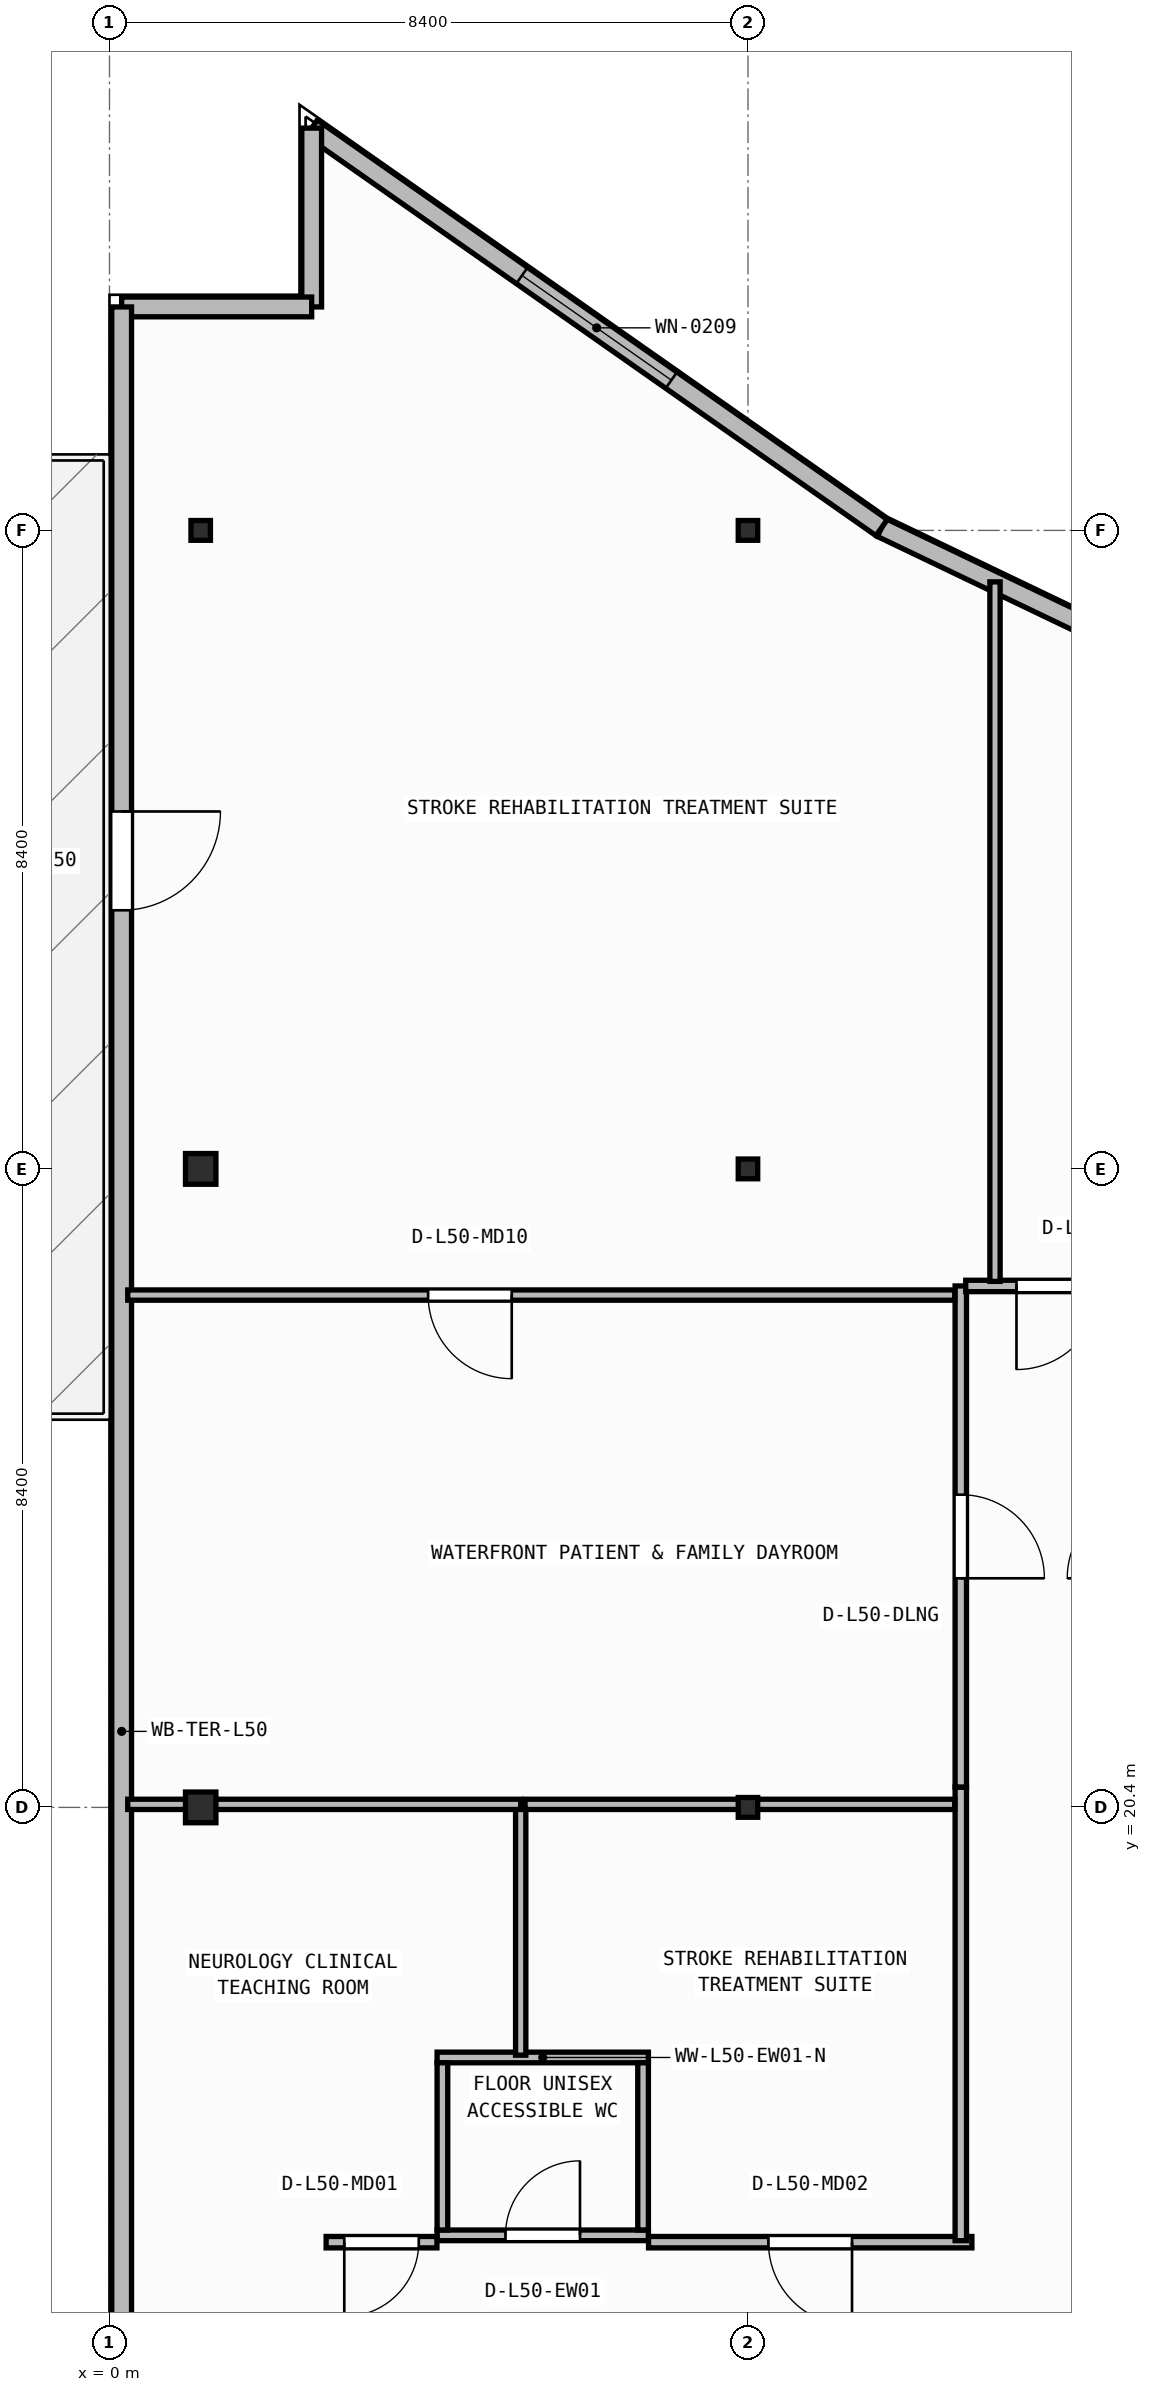
"""IFC4 building model, lengths in metres.
Left out: names, types, materials, properties, quantities, classifications, styles, units other than length and angle.
Written with IfcOpenShell. Run it as: python <this file> out.ifc"""

import sys

from ifc_helpers import new_model, si_unit, direction, frame, frame_2d, origin, origin_2d, place, context, subcontext, project, spatial, rectangle, i_section, extrude, element, fill, save


model = new_model("IFC4")
c1 = context("Model", 3, precision=1e-05, world=origin(), true_north=direction((0.0, 1.0)))
c2 = subcontext(c1, "Body", "Model", "MODEL_VIEW")
j1 = project(units=[si_unit("LENGTHUNIT", "METRE"), si_unit("PLANEANGLEUNIT", "RADIAN")], contexts=[c1])
p1 = place(None, origin())
s1 = spatial("IfcSite", under=j1, at=p1, CompositionType="ELEMENT")
p2 = place(p1, origin())
s2 = spatial("IfcBuilding", under=s1, at=p2, CompositionType="ELEMENT")
p3 = place(p2, frame((0.0, 0.0, 203.95)))
s3 = spatial("IfcBuildingStorey", under=s2, at=p3, CompositionType="ELEMENT", Elevation=203.95)
p4 = place(p3, frame((1.2, 20.4, 0.0), z_axis=(0.0, 0.0, 1.0), x_axis=(1.0, 0.0, 0.0)))
e1 = element("IfcColumn", 1, at=p4, inside=s3, PredefinedType="COLUMN", context=c2, shape_type="SweptSolid", body=[
    extrude(i_section(OverallWidth=0.4, OverallDepth=0.404, WebThickness=0.02, FlangeThickness=0.032, at=origin_2d()), origin(), (0.0, 0.0, 1.0), 3.95),
])
p5 = place(p3, frame((8.4, 20.4, 0.0), z_axis=(0.0, 0.0, 1.0), x_axis=(1.0, 0.0, 0.0)))
e2 = element("IfcColumn", 2, at=p5, inside=s3, PredefinedType="COLUMN", context=c2, shape_type="SweptSolid", body=[
    extrude(i_section(OverallWidth=0.256, OverallDepth=0.26, WebThickness=0.01, FlangeThickness=0.017, FilletRadius=0.013, at=origin_2d()), origin(), (0.0, 0.0, 1.0), 3.95),
])
p6 = place(p3, frame((1.2, 28.8, 0.0), z_axis=(0.0, 0.0, 1.0), x_axis=(1.0, 0.0, 0.0)))
e3 = element("IfcColumn", 3, at=p6, inside=s3, PredefinedType="COLUMN", context=c2, shape_type="SweptSolid", body=[
    extrude(i_section(OverallWidth=0.4, OverallDepth=0.404, WebThickness=0.02, FlangeThickness=0.032, at=origin_2d()), origin(), (0.0, 0.0, 1.0), 3.95),
])
for number, where, z_axis, x_axis in (
    (4, (8.4, 28.8, 0.0), (0.0, 0.0, 1.0), (1.0, 0.0, 0.0)),
    (5, (1.2, 37.2, 0.0), (0.0, 0.0, 1.0), (1.0, 0.0, 0.0)),
    (6, (8.4, 37.2, 0.0), (0.0, 0.0, 1.0), (1.0, 0.0, 0.0)),
):
    element("IfcColumn", number, at=place(p3, frame(where, z_axis=z_axis, x_axis=x_axis)), inside=s3, PredefinedType="COLUMN", context=c2, shape_type="SweptSolid", body=[
        extrude(i_section(OverallWidth=0.256, OverallDepth=0.26, WebThickness=0.01, FlangeThickness=0.017, FilletRadius=0.013, at=origin_2d()), origin(), (0.0, 0.0, 1.0), 3.95),
    ])
p7 = place(p3, frame((21.461, 31.823, 0.0), z_axis=(0.0, 0.0, 1.0), x_axis=(-0.901858094827, 0.432032379336, 0.0)))
e7 = element("IfcWall", 7, at=p7, inside=s3, PredefinedType="STANDARD", context=c2, shape_type="SweptSolid", body=[
    extrude(rectangle(XDim=12.532, YDim=0.26, at=frame_2d((6.266, 0.0))), origin(), (0.0, 0.0, 1.0), 3.71),
])
p8 = place(p7, frame((5.066, 0.0, 0.9)))
e8 = element("IfcOpeningElement", 8, at=p8, cuts=e7, PredefinedType="OPENING", context=c2, shape_type="SweptSolid", body=[
    extrude(rectangle(XDim=2.4, YDim=1.65, at=frame_2d((1.2, 0.825))), frame((0.0, 0.14, 0.0), z_axis=(0.0, -1.0, 0.0), x_axis=(1.0, 0.0, 0.0)), (0.0, 0.0, 1.0), 0.28),
])
p9 = place(p3, frame((10.159, 37.237, 0.0), z_axis=(0.0, 0.0, 1.0), x_axis=(-0.818933702389, 0.57388813465, 0.0)))
e9 = element("IfcWall", 9, at=p9, inside=s3, PredefinedType="STANDARD", context=c2, shape_type="SweptSolid", body=[
    extrude(rectangle(XDim=9.157, YDim=0.26, at=frame_2d((4.579, 0.0))), origin(), (0.0, 0.0, 1.0), 3.71),
])
p10 = place(p9, frame((3.378, 0.0, 0.9)))
e10 = element("IfcOpeningElement", 10, at=p10, cuts=e9, PredefinedType="OPENING", context=c2, shape_type="SweptSolid", body=[
    extrude(rectangle(XDim=2.4, YDim=1.65, at=frame_2d((1.2, 0.825))), frame((0.0, 0.14, 0.0), z_axis=(0.0, -1.0, 0.0), x_axis=(1.0, 0.0, 0.0)), (0.0, 0.0, 1.0), 0.28),
])
p11 = place(p3, frame((2.66, 42.492, 0.0), z_axis=(0.0, 0.0, 1.0), x_axis=(0.0, -1.0, 0.0)))
e11 = element("IfcWall", 11, at=p11, inside=s3, PredefinedType="STANDARD", context=c2, shape_type="SweptSolid", body=[
    extrude(rectangle(XDim=2.353, YDim=0.26, at=frame_2d((1.176, 0.0))), origin(), (0.0, 0.0, 1.0), 3.71),
])
p12 = place(p3, frame((2.66, 40.14, 0.0), z_axis=(0.0, 0.0, 1.0), x_axis=(-1.0, 0.0, 0.0)))
e12 = element("IfcWall", 12, at=p12, inside=s3, PredefinedType="STANDARD", context=c2, shape_type="SweptSolid", body=[
    extrude(rectangle(XDim=2.5, YDim=0.26, at=frame_2d((1.25, 0.0))), origin(), (0.0, 0.0, 1.0), 3.71),
])
p13 = place(p3, frame((0.16, 40.14, 0.0), z_axis=(0.0, 0.0, 1.0), x_axis=(0.0, -1.0, 0.0)))
e13 = element("IfcWall", 13, at=p13, inside=s3, PredefinedType="STANDARD", context=c2, shape_type="SweptSolid", body=[
    extrude(rectangle(XDim=37.48, YDim=0.26, at=frame_2d((18.74, 0.0))), origin(), (0.0, 0.0, 1.0), 3.71),
])
p14 = place(p13, frame((6.638, 0.0, 0.0)))
e14 = element("IfcOpeningElement", 14, at=p14, cuts=e13, PredefinedType="OPENING", context=c2, shape_type="SweptSolid", body=[
    extrude(rectangle(XDim=1.3, YDim=2.15, at=frame_2d((0.65, 1.075))), frame((0.0, 0.14, 0.0), z_axis=(0.0, -1.0, 0.0), x_axis=(1.0, 0.0, 0.0)), (0.0, 0.0, 1.0), 0.28),
])
p15 = place(p3, frame((4.31, 14.77, 0.0), z_axis=(0.0, 0.0, 1.0), x_axis=(1.0, 0.0, 0.0)))
e15 = element("IfcWall", 15, at=p15, inside=s3, PredefinedType="PARTITIONING", context=c2, shape_type="SweptSolid", body=[
    extrude(rectangle(XDim=2.78, YDim=0.14, at=frame_2d((1.39, 0.0))), origin(), (0.0, 0.0, 1.0), 3.71),
])
p16 = place(p15, frame((0.9, 0.0, 0.0)))
e16 = element("IfcOpeningElement", 16, at=p16, cuts=e15, PredefinedType="OPENING", context=c2, shape_type="SweptSolid", body=[
    extrude(rectangle(XDim=0.98, YDim=2.1, at=frame_2d((0.49, 1.05))), frame((0.0, 0.08, 0.0), z_axis=(0.0, -1.0, 0.0), x_axis=(1.0, 0.0, 0.0)), (0.0, 0.0, 1.0), 0.16),
])
p17 = place(p3, frame((4.31, 17.11, 0.0), z_axis=(0.0, 0.0, 1.0), x_axis=(1.0, 0.0, 0.0)))
e17 = element("IfcWall", 17, at=p17, inside=s3, PredefinedType="PARTITIONING", context=c2, shape_type="SweptSolid", body=[
    extrude(rectangle(XDim=2.78, YDim=0.14, at=frame_2d((1.39, 0.0))), origin(), (0.0, 0.0, 1.0), 3.71),
])
for number, where, z_axis, x_axis in (
    (18, (4.38, 14.84, 0.0), (0.0, 0.0, 1.0), (0.0, 1.0, 0.0)),
    (19, (7.02, 14.84, 0.0), (0.0, 0.0, 1.0), (0.0, 1.0, 0.0)),
):
    element("IfcWall", number, at=place(p3, frame(where, z_axis=z_axis, x_axis=x_axis)), inside=s3, PredefinedType="PARTITIONING", context=c2, shape_type="SweptSolid", body=[
        extrude(rectangle(XDim=2.2, YDim=0.14, at=frame_2d((1.1, 0.0))), origin(), (0.0, 0.0, 1.0), 3.71),
    ])
p18 = place(p3, frame((4.308, 14.68, 0.0), z_axis=(0.0, 0.0, 1.0), x_axis=(-1.0, 0.0, 0.0)))
e20 = element("IfcWall", 20, at=p18, inside=s3, PredefinedType="PARTITIONING", context=c2, shape_type="SweptSolid", body=[
    extrude(rectangle(XDim=1.458, YDim=0.15, at=frame_2d((0.729, 0.0))), origin(), (0.0, 0.0, 1.0), 3.71),
])
p19 = place(p18, frame((0.239, 0.0, 0.0)))
e21 = element("IfcOpeningElement", 21, at=p19, cuts=e20, PredefinedType="OPENING", context=c2, shape_type="SweptSolid", body=[
    extrude(rectangle(XDim=0.98, YDim=2.1, at=frame_2d((0.49, 1.05))), frame((0.0, 0.085, 0.0), z_axis=(0.0, -1.0, 0.0), x_axis=(1.0, 0.0, 0.0)), (0.0, 0.0, 1.0), 0.17),
])
p20 = place(p3, frame((11.346, 14.68, 0.0), z_axis=(0.0, 0.0, 1.0), x_axis=(-1.0, 0.0, 0.0)))
e22 = element("IfcWall", 22, at=p20, inside=s3, PredefinedType="PARTITIONING", context=c2, shape_type="SweptSolid", body=[
    extrude(rectangle(XDim=4.254, YDim=0.15, at=frame_2d((2.127, 0.0))), origin(), (0.0, 0.0, 1.0), 3.71),
])
p21 = place(p20, frame((1.577, 0.0, 0.0)))
e23 = element("IfcOpeningElement", 23, at=p21, cuts=e22, PredefinedType="OPENING", context=c2, shape_type="SweptSolid", body=[
    extrude(rectangle(XDim=1.1, YDim=2.1, at=frame_2d((0.55, 1.05))), frame((0.0, 0.085, 0.0), z_axis=(0.0, -1.0, 0.0), x_axis=(1.0, 0.0, 0.0)), (0.0, 0.0, 1.0), 0.17),
])
p22 = place(p3, frame((11.2, 20.666, 0.0), z_axis=(0.0, 0.0, 1.0), x_axis=(0.0, -1.0, 0.0)))
e24 = element("IfcWall", 24, at=p22, inside=s3, PredefinedType="PARTITIONING", context=c2, shape_type="SweptSolid", body=[
    extrude(rectangle(XDim=5.966, YDim=0.15, at=frame_2d((2.983, 0.0))), origin(), (0.0, 0.0, 1.0), 3.71),
])
p23 = place(p3, frame((11.2, 27.26, 0.0), z_axis=(0.0, 0.0, 1.0), x_axis=(0.0, -1.0, 0.0)))
e25 = element("IfcWall", 25, at=p23, inside=s3, PredefinedType="PARTITIONING", context=c2, shape_type="SweptSolid", body=[
    extrude(rectangle(XDim=6.592, YDim=0.15, at=frame_2d((3.296, 0.0))), origin(), (0.0, 0.0, 1.0), 3.71),
])
p24 = place(p23, frame((2.746, 0.0, 0.0)))
e26 = element("IfcOpeningElement", 26, at=p24, cuts=e25, PredefinedType="OPENING", context=c2, shape_type="SweptSolid", body=[
    extrude(rectangle(XDim=1.1, YDim=2.1, at=frame_2d((0.55, 1.05))), frame((0.0, 0.085, 0.0), z_axis=(0.0, -1.0, 0.0), x_axis=(1.0, 0.0, 0.0)), (0.0, 0.0, 1.0), 0.17),
])
p25 = place(p3, frame((13.7, 27.26, 0.0), z_axis=(0.0, 0.0, 1.0), x_axis=(-1.0, 0.0, 0.0)))
e27 = element("IfcWall", 27, at=p25, inside=s3, PredefinedType="PARTITIONING", context=c2, shape_type="SweptSolid", body=[
    extrude(rectangle(XDim=2.435, YDim=0.15, at=frame_2d((1.218, 0.0))), origin(), (0.0, 0.0, 1.0), 3.71),
])
p26 = place(p25, frame((0.667, 0.0, 0.0)))
e28 = element("IfcOpeningElement", 28, at=p26, cuts=e27, PredefinedType="OPENING", context=c2, shape_type="SweptSolid", body=[
    extrude(rectangle(XDim=1.1, YDim=2.1, at=frame_2d((0.55, 1.05))), frame((0.0, 0.085, 0.0), z_axis=(0.0, -1.0, 0.0), x_axis=(1.0, 0.0, 0.0)), (0.0, 0.0, 1.0), 0.17),
])
p27 = place(p3, frame((5.41, 17.14, 0.0), z_axis=(0.0, 0.0, 1.0), x_axis=(0.0, 1.0, 0.0)))
e29 = element("IfcWall", 29, at=p27, inside=s3, PredefinedType="PARTITIONING", context=c2, shape_type="SweptSolid", body=[
    extrude(rectangle(XDim=3.3, YDim=0.135, at=frame_2d((1.65, 0.0))), origin(), (0.0, 0.0, 1.0), 3.71),
])
p28 = place(p3, frame((5.41, 20.44, 0.0), z_axis=(0.0, 0.0, 1.0), x_axis=(-1.0, 0.0, 0.0)))
e30 = element("IfcWall", 30, at=p28, inside=s3, PredefinedType="PARTITIONING", context=c2, shape_type="SweptSolid", body=[
    extrude(rectangle(XDim=5.17, YDim=0.135, at=frame_2d((2.585, 0.0))), origin(), (0.0, 0.0, 1.0), 3.152),
])
p29 = place(p3, frame((11.12, 20.44, 0.0), z_axis=(0.0, 0.0, 1.0), x_axis=(-1.0, 0.0, 0.0)))
e31 = element("IfcWall", 31, at=p29, inside=s3, PredefinedType="PARTITIONING", context=c2, shape_type="SweptSolid", body=[
    extrude(rectangle(XDim=5.653, YDim=0.135, at=frame_2d((2.826, 0.0))), origin(), (0.0, 0.0, 1.0), 3.152),
])
p30 = place(p3, frame((11.12, 27.14, 0.0), z_axis=(0.0, 0.0, 1.0), x_axis=(-1.0, 0.0, 0.0)))
e32 = element("IfcWall", 32, at=p30, inside=s3, PredefinedType="PARTITIONING", context=c2, shape_type="SweptSolid", body=[
    extrude(rectangle(XDim=10.88, YDim=0.135, at=frame_2d((5.44, 0.0))), origin(), (0.0, 0.0, 1.0), 3.71),
])
p31 = place(p30, frame((5.828, 0.0, 0.0)))
e33 = element("IfcOpeningElement", 33, at=p31, cuts=e32, PredefinedType="OPENING", context=c2, shape_type="SweptSolid", body=[
    extrude(rectangle(XDim=1.1, YDim=2.1, at=frame_2d((0.55, 1.05))), frame((0.0, 0.077, 0.0), z_axis=(0.0, -1.0, 0.0), x_axis=(1.0, 0.0, 0.0)), (0.0, 0.0, 1.0), 0.155),
])
p32 = place(p3, frame((11.65, 27.32, 0.0), z_axis=(0.0, 0.0, 1.0), x_axis=(0.0, 1.0, 0.0)))
e34 = element("IfcWall", 34, at=p32, inside=s3, PredefinedType="PARTITIONING", context=c2, shape_type="SweptSolid", body=[
    extrude(rectangle(XDim=9.203, YDim=0.135, at=frame_2d((4.602, 0.0))), origin(), (0.0, 0.0, 1.0), 3.71),
])
p33 = place(p10, origin())
e35 = element("IfcWindow", 35, at=p33, inside=s3, PartitioningType="SINGLE_PANEL", PredefinedType="WINDOW", context=c2, shape_type="SweptSolid", body=[
    extrude(rectangle(XDim=2.4, YDim=1.65, at=frame_2d((1.2, 0.825))), frame((0.0, 0.03, 0.0), z_axis=(0.0, -1.0, 0.0), x_axis=(1.0, 0.0, 0.0)), (0.0, 0.0, 1.0), 0.06),
])
fill(e10, e35)
p34 = place(p14, origin())
e36 = element("IfcDoor", 36, at=p34, inside=s3, OperationType="SINGLE_SWING_LEFT", PredefinedType="DOOR", context=c2, shape_type="SweptSolid", body=[
    extrude(rectangle(XDim=1.3, YDim=2.15, at=frame_2d((0.65, 1.075))), frame((0.0, 0.025, 0.0), z_axis=(0.0, -1.0, 0.0), x_axis=(1.0, 0.0, 0.0)), (0.0, 0.0, 1.0), 0.05),
])
fill(e14, e36)
p35 = place(p16, origin())
e37 = element("IfcDoor", 37, at=p35, inside=s3, OperationType="SINGLE_SWING_RIGHT", PredefinedType="DOOR", context=c2, shape_type="SweptSolid", body=[
    extrude(rectangle(XDim=0.98, YDim=2.1, at=frame_2d((0.49, 1.05))), frame((0.0, 0.025, 0.0), z_axis=(0.0, -1.0, 0.0), x_axis=(1.0, 0.0, 0.0)), (0.0, 0.0, 1.0), 0.05),
])
fill(e16, e37)
p36 = place(p19, origin())
e38 = element("IfcDoor", 38, at=p36, inside=s3, OperationType="SINGLE_SWING_RIGHT", PredefinedType="DOOR", context=c2, shape_type="SweptSolid", body=[
    extrude(rectangle(XDim=0.98, YDim=2.1, at=frame_2d((0.49, 1.05))), frame((0.0, 0.025, 0.0), z_axis=(0.0, -1.0, 0.0), x_axis=(1.0, 0.0, 0.0)), (0.0, 0.0, 1.0), 0.05),
])
fill(e21, e38)
p37 = place(p21, origin())
e39 = element("IfcDoor", 39, at=p37, inside=s3, OperationType="SINGLE_SWING_LEFT", PredefinedType="DOOR", context=c2, shape_type="SweptSolid", body=[
    extrude(rectangle(XDim=1.1, YDim=2.1, at=frame_2d((0.55, 1.05))), frame((0.0, 0.025, 0.0), z_axis=(0.0, -1.0, 0.0), x_axis=(1.0, 0.0, 0.0)), (0.0, 0.0, 1.0), 0.05),
])
fill(e23, e39)
p38 = place(p24, origin())
e40 = element("IfcDoor", 40, at=p38, inside=s3, OperationType="SINGLE_SWING_RIGHT", PredefinedType="DOOR", context=c2, shape_type="SweptSolid", body=[
    extrude(rectangle(XDim=1.1, YDim=2.1, at=frame_2d((0.55, 1.05))), frame((0.0, 0.025, 0.0), z_axis=(0.0, -1.0, 0.0), x_axis=(1.0, 0.0, 0.0)), (0.0, 0.0, 1.0), 0.05),
])
fill(e26, e40)
p39 = place(p26, origin())
e41 = element("IfcDoor", 41, at=p39, inside=s3, OperationType="SINGLE_SWING_RIGHT", PredefinedType="DOOR", context=c2, shape_type="SweptSolid", body=[
    extrude(rectangle(XDim=1.1, YDim=2.1, at=frame_2d((0.55, 1.05))), frame((0.0, 0.025, 0.0), z_axis=(0.0, -1.0, 0.0), x_axis=(1.0, 0.0, 0.0)), (0.0, 0.0, 1.0), 0.05),
])
fill(e28, e41)
p40 = place(p31, origin())
e42 = element("IfcDoor", 42, at=p40, inside=s3, OperationType="SINGLE_SWING_LEFT", PredefinedType="DOOR", context=c2, shape_type="SweptSolid", body=[
    extrude(rectangle(XDim=1.1, YDim=2.1, at=frame_2d((0.55, 1.05))), frame((0.0, 0.025, 0.0), z_axis=(0.0, -1.0, 0.0), x_axis=(1.0, 0.0, 0.0)), (0.0, 0.0, 1.0), 0.05),
])
fill(e33, e42)
save(model, sys.argv[1])
